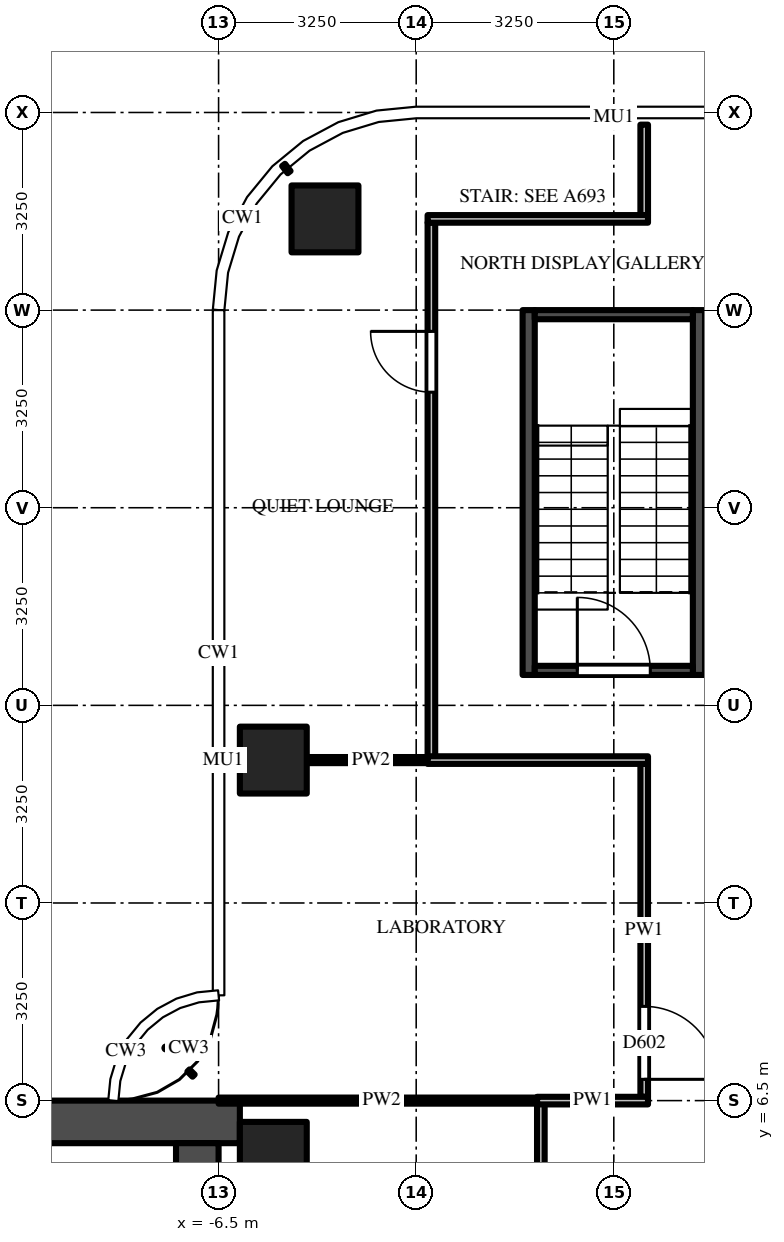
"""IFC4 building model, lengths in metres.
Left out: names, types, materials, properties, quantities, classifications, styles, units other than length and angle.
Written with IfcOpenShell. Run it as: python <this file> out.ifc"""

import sys

from ifc_helpers import new_model, si_unit, direction, frame, frame_2d, origin, origin_2d, place, context, subcontext, project, spatial, rectangle, extrude, source, transform, mapped, element, fill, save


model = new_model("IFC4")
c1 = context("Model", 3, precision=1e-05, world=origin(), true_north=direction((0.0, 1.0)))
c2 = subcontext(c1, "Body", "Model", "MODEL_VIEW")
j1 = project(units=[si_unit("LENGTHUNIT", "METRE"), si_unit("PLANEANGLEUNIT", "RADIAN")], contexts=[c1])
p1 = place(None, origin())
s1 = spatial("IfcSite", under=j1, at=p1, CompositionType="ELEMENT")
p2 = place(p1, origin())
s2 = spatial("IfcBuilding", under=s1, at=p2, CompositionType="ELEMENT")
p3 = place(p2, frame((0.0, 0.0, 236.3)))
s3 = spatial("IfcBuildingStorey", under=s2, at=p3, CompositionType="ELEMENT", Elevation=236.3)
m1 = source(origin(), c2, "Body", "SweptSolid", [
    extrude(rectangle(XDim=1.1, YDim=1.1, at=origin_2d()), origin(), (0.0, 0.0, 1.0), 3.9),
])
for number, where, z_axis, x_axis in (
    (1, (-5.6, 12.1, 0.0), (0.0, 0.0, 1.0), (1.0, 0.0, 0.0)),
    (2, (-4.75, 21.0, 0.0), (0.0, 0.0, 1.0), (1.0, 0.0, 0.0)),
    (3, (-5.6, 5.6, 0.0), (0.0, 0.0, 1.0), (1.0, 0.0, 0.0)),
):
    element("IfcColumn", number, at=place(p3, frame(where, z_axis=z_axis, x_axis=x_axis)), inside=s3, PredefinedType="COLUMN", context=c2, shape_type="MappedRepresentation", body=[
        mapped(m1, transform((0.0, 0.0, 0.0))),
    ])
m2 = source(origin(), c2, "Body", "SweptSolid", [
    extrude(rectangle(XDim=16.6, YDim=0.7, at=frame_2d((8.3, 0.0))), origin(), (0.0, 0.0, 1.0), 3.7),
])
p4 = place(p3, frame((-6.15, 6.15, 0.0), z_axis=(0.0, 0.0, 1.0), x_axis=(-1.0, 0.0, 0.0)))
e4 = element("IfcWall", 4, at=p4, inside=s3, PredefinedType="SHEAR", context=c2, shape_type="MappedRepresentation", body=[
    mapped(m2, transform((0.0, 0.0, 0.0))),
])
m3 = source(origin(), c2, "Body", "SweptSolid", [
    extrude(rectangle(XDim=9.05, YDim=0.7, at=frame_2d((4.525, 0.0))), origin(), (0.0, 0.0, 1.0), 3.7),
])
p5 = place(p3, frame((-6.85, 5.8, 0.0), z_axis=(0.0, 0.0, 1.0), x_axis=(0.0, -1.0, 0.0)))
e5 = element("IfcWall", 5, at=p5, inside=s3, PredefinedType="SHEAR", context=c2, shape_type="MappedRepresentation", body=[
    mapped(m3, transform((0.0, 0.0, 0.0))),
])
m4 = source(origin(), c2, "Body", "SweptSolid", [
    extrude(rectangle(XDim=1.8, YDim=2.1, at=frame_2d((0.9, 1.05))), frame((0.0, 0.36, 0.0), z_axis=(0.0, -1.0, 0.0), x_axis=(1.0, 0.0, 0.0)), (0.0, 0.0, 1.0), 0.72),
])
p6 = place(p5, frame((3.15, 0.0, 0.0)))
e6 = element("IfcOpeningElement", 6, at=p6, cuts=e5, PredefinedType="OPENING", context=c2, shape_type="MappedRepresentation", body=[
    mapped(m4, transform((0.0, 0.0, 0.0))),
])
m5 = source(origin(), c2, "Body", "SweptSolid", [
    extrude(rectangle(XDim=6.0, YDim=0.2, at=frame_2d((3.0, 0.0))), origin(), (0.0, 0.0, 1.0), 3.7),
])
for number, where, z_axis, x_axis in (
    (7, (-1.4, 13.5, 0.0), (0.0, 0.0, 1.0), (0.0, 1.0, 0.0)),
    (8, (1.4, 13.5, 0.0), (0.0, 0.0, 1.0), (0.0, 1.0, 0.0)),
):
    element("IfcWall", number, at=place(p3, frame(where, z_axis=z_axis, x_axis=x_axis)), inside=s3, PredefinedType="SHEAR", context=c2, shape_type="MappedRepresentation", body=[
        mapped(m5, transform((0.0, 0.0, 0.0))),
    ])
m6 = source(origin(), c2, "Body", "SweptSolid", [
    extrude(rectangle(XDim=2.6, YDim=0.15, at=frame_2d((1.3, 0.0))), origin(), (0.0, 0.0, 1.0), 3.7),
])
p7 = place(p3, frame((-1.3, 13.575, 0.0), z_axis=(0.0, 0.0, 1.0), x_axis=(1.0, 0.0, 0.0)))
e9 = element("IfcWall", 9, at=p7, inside=s3, PredefinedType="SHEAR", context=c2, shape_type="MappedRepresentation", body=[
    mapped(m6, transform((0.0, 0.0, 0.0))),
])
m7 = source(origin(), c2, "Body", "SweptSolid", [
    extrude(rectangle(XDim=1.2, YDim=2.1, at=frame_2d((0.6, 1.05))), frame((0.0, 0.085, 0.0), z_axis=(0.0, -1.0, 0.0), x_axis=(1.0, 0.0, 0.0)), (0.0, 0.0, 1.0), 0.17),
])
p8 = place(p7, frame((0.7, 0.0, 0.0)))
e10 = element("IfcOpeningElement", 10, at=p8, cuts=e9, PredefinedType="OPENING", context=c2, shape_type="MappedRepresentation", body=[
    mapped(m7, transform((0.0, 0.0, 0.0))),
])
p9 = place(p3, frame((-1.3, 19.425, 0.0), z_axis=(0.0, 0.0, 1.0), x_axis=(1.0, 0.0, 0.0)))
e11 = element("IfcWall", 11, at=p9, inside=s3, PredefinedType="SHEAR", context=c2, shape_type="MappedRepresentation", body=[
    mapped(m6, transform((0.0, 0.0, 0.0))),
])
m8 = source(origin(), c2, "Body", "SweptSolid", [
    extrude(rectangle(XDim=8.788, YDim=0.125, at=frame_2d((4.394, 0.0))), origin(), (0.0, 0.0, 1.0), 2.78),
])
p10 = place(p3, frame((-3.0, 12.15, 0.0), z_axis=(0.0, 0.0, 1.0), x_axis=(0.0, 1.0, 0.0)))
e12 = element("IfcWall", 12, at=p10, inside=s3, PredefinedType="PARTITIONING", context=c2, shape_type="MappedRepresentation", body=[
    mapped(m8, transform((0.0, 0.0, 0.0))),
])
m9 = source(origin(), c2, "Body", "SweptSolid", [
    extrude(rectangle(XDim=1.0, YDim=2.1, at=frame_2d((0.5, 1.05))), frame((0.0, 0.073, 0.0), z_axis=(0.0, -1.0, 0.0), x_axis=(1.0, 0.0, 0.0)), (0.0, 0.0, 1.0), 0.145),
])
p11 = place(p10, frame((6.0, 0.0, 0.0)))
e13 = element("IfcOpeningElement", 13, at=p11, cuts=e12, PredefinedType="OPENING", context=c2, shape_type="MappedRepresentation", body=[
    mapped(m9, transform((0.0, 0.0, 0.0))),
])
m10 = source(origin(), c2, "Body", "SweptSolid", [
    extrude(rectangle(XDim=3.137, YDim=0.125, at=frame_2d((1.569, 0.0))), origin(), (0.0, 0.0, 1.0), 2.996),
])
p12 = place(p3, frame((-1.2, 6.45, 0.0), z_axis=(0.0, 0.0, 1.0), x_axis=(0.0, -1.0, 0.0)))
e14 = element("IfcWall", 14, at=p12, inside=s3, PredefinedType="PARTITIONING", context=c2, shape_type="MappedRepresentation", body=[
    mapped(m10, transform((0.0, 0.0, 0.0))),
])
m11 = source(origin(), c2, "Body", "SweptSolid", [
    extrude(rectangle(XDim=5.475, YDim=0.125, at=frame_2d((2.738, 0.0))), origin(), (0.0, 0.0, 1.0), 2.996),
])
p13 = place(p3, frame((0.5, 12.038, 0.0), z_axis=(0.0, 0.0, 1.0), x_axis=(0.0, -1.0, 0.0)))
e15 = element("IfcWall", 15, at=p13, inside=s3, PredefinedType="PARTITIONING", context=c2, shape_type="MappedRepresentation", body=[
    mapped(m11, transform((0.0, 0.0, 0.0))),
])
m12 = source(origin(), c2, "Body", "SweptSolid", [
    extrude(rectangle(XDim=1.2, YDim=2.1, at=frame_2d((0.6, 1.05))), frame((0.0, 0.073, 0.0), z_axis=(0.0, -1.0, 0.0), x_axis=(1.0, 0.0, 0.0)), (0.0, 0.0, 1.0), 0.145),
])
p14 = place(p13, frame((3.988, 0.0, 0.0)))
e16 = element("IfcOpeningElement", 16, at=p14, cuts=e15, PredefinedType="OPENING", context=c2, shape_type="MappedRepresentation", body=[
    mapped(m12, transform((0.0, 0.0, 0.0))),
])
m13 = source(origin(), c2, "Body", "SweptSolid", [
    extrude(rectangle(XDim=1.488, YDim=0.125, at=frame_2d((0.744, 0.0))), origin(), (0.0, 0.0, 1.0), 2.78),
])
p15 = place(p3, frame((0.5, 22.55, 0.0), z_axis=(0.0, 0.0, 1.0), x_axis=(0.0, -1.0, 0.0)))
e17 = element("IfcWall", 17, at=p15, inside=s3, PredefinedType="PARTITIONING", context=c2, shape_type="MappedRepresentation", body=[
    mapped(m13, transform((0.0, 0.0, 0.0))),
])
m14 = source(origin(), c2, "Body", "SweptSolid", [
    extrude(rectangle(XDim=5.363, YDim=0.1, at=frame_2d((2.681, 0.0))), origin(), (0.0, 0.0, 1.0), 2.78),
])
p16 = place(p3, frame((-6.5, 6.5, 0.0), z_axis=(0.0, 0.0, 1.0), x_axis=(1.0, 0.0, 0.0)))
e18 = element("IfcWall", 18, at=p16, inside=s3, PredefinedType="PARTITIONING", context=c2, shape_type="MappedRepresentation", body=[
    mapped(m14, transform((0.0, 0.0, 0.0))),
])
m15 = source(origin(), c2, "Body", "SweptSolid", [
    extrude(rectangle(XDim=1.825, YDim=0.125, at=frame_2d((0.913, 0.0))), origin(), (0.0, 0.0, 1.0), 3.7),
])
p17 = place(p3, frame((-1.262, 6.5, 0.0), z_axis=(0.0, 0.0, 1.0), x_axis=(1.0, 0.0, 0.0)))
e19 = element("IfcWall", 19, at=p17, inside=s3, PredefinedType="PARTITIONING", context=c2, shape_type="MappedRepresentation", body=[
    mapped(m15, transform((0.0, 0.0, 0.0))),
])
m16 = source(origin(), c2, "Body", "SweptSolid", [
    extrude(rectangle(XDim=2.113, YDim=0.1, at=frame_2d((1.056, 0.0))), origin(), (0.0, 0.0, 1.0), 2.996),
])
p18 = place(p3, frame((-5.05, 12.1, 0.0), z_axis=(0.0, 0.0, 1.0), x_axis=(1.0, 0.0, 0.0)))
e20 = element("IfcWall", 20, at=p18, inside=s3, PredefinedType="PARTITIONING", context=c2, shape_type="MappedRepresentation", body=[
    mapped(m16, transform((0.0, 0.0, 0.0))),
])
m17 = source(origin(), c2, "Body", "SweptSolid", [
    extrude(rectangle(XDim=3.625, YDim=0.125, at=frame_2d((1.812, 0.0))), origin(), (0.0, 0.0, 1.0), 2.996),
])
p19 = place(p3, frame((0.562, 12.1, 0.0), z_axis=(0.0, 0.0, 1.0), x_axis=(-1.0, 0.0, 0.0)))
e21 = element("IfcWall", 21, at=p19, inside=s3, PredefinedType="PARTITIONING", context=c2, shape_type="MappedRepresentation", body=[
    mapped(m17, transform((0.0, 0.0, 0.0))),
])
m18 = source(origin(), c2, "Body", "SweptSolid", [
    extrude(rectangle(XDim=3.625, YDim=0.125, at=frame_2d((1.812, 0.0))), origin(), (0.0, 0.0, 1.0), 2.78),
])
p20 = place(p3, frame((-3.062, 21.0, 0.0), z_axis=(0.0, 0.0, 1.0), x_axis=(1.0, 0.0, 0.0)))
e22 = element("IfcWall", 22, at=p20, inside=s3, PredefinedType="PARTITIONING", context=c2, shape_type="MappedRepresentation", body=[
    mapped(m18, transform((0.0, 0.0, 0.0))),
])
m19 = source(origin(), c2, "Body", "SweptSolid", [
    extrude(rectangle(XDim=1.2, YDim=2.1, at=frame_2d((0.6, 1.05))), frame((0.0, 0.025, 0.0), z_axis=(0.0, -1.0, 0.0), x_axis=(1.0, 0.0, 0.0)), (0.0, 0.0, 1.0), 0.05),
])
p21 = place(p8, origin())
e23 = element("IfcDoor", 23, at=p21, inside=s3, OperationType="SINGLE_SWING_LEFT", PredefinedType="DOOR", context=c2, shape_type="MappedRepresentation", body=[
    mapped(m19, transform((0.0, 0.0, 0.0))),
])
fill(e10, e23)
p22 = place(p14, origin())
e24 = element("IfcDoor", 24, at=p22, inside=s3, OperationType="SINGLE_SWING_RIGHT", PredefinedType="DOOR", context=c2, shape_type="MappedRepresentation", body=[
    mapped(m19, transform((0.0, 0.0, 0.0))),
])
fill(e16, e24)
m20 = source(origin(), c2, "Body", "SweptSolid", [
    extrude(rectangle(XDim=1.0, YDim=2.1, at=frame_2d((0.5, 1.05))), frame((0.0, 0.025, 0.0), z_axis=(0.0, -1.0, 0.0), x_axis=(1.0, 0.0, 0.0)), (0.0, 0.0, 1.0), 0.05),
])
p23 = place(p11, origin())
e25 = element("IfcDoor", 25, at=p23, inside=s3, OperationType="SINGLE_SWING_RIGHT", PredefinedType="DOOR", context=c2, shape_type="MappedRepresentation", body=[
    mapped(m20, transform((0.0, 0.0, 0.0))),
])
fill(e13, e25)
save(model, sys.argv[1])
